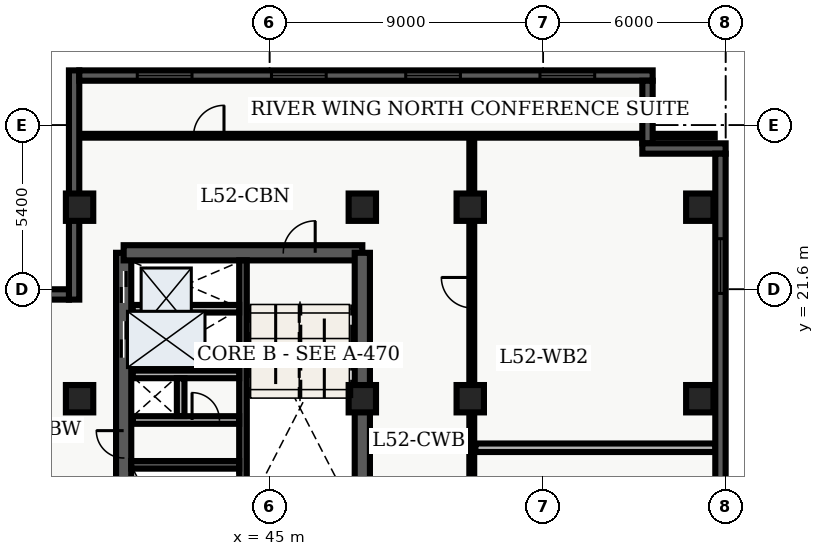
"""IFC4 building model, lengths in metres.
Left out: names, types, materials, properties, quantities, classifications, styles, units other than length and angle.
Written with IfcOpenShell. Run it as: python <this file> out.ifc"""

import sys

from ifc_helpers import new_model, entity, si_unit, converted_unit, direction, frame, origin_with_axes, origin_2d_with_axis, place, context, subcontext, project, spatial, polyline, rectangle, outline, extrude, element, fill, save


model = new_model("IFC4")
c1 = context("Model", 3, precision=1e-05, world=origin_with_axes(), true_north=direction((0.0, 1.0)))
c2 = subcontext(c1, "Body", "Model", "MODEL_VIEW")
j1 = project(units=[si_unit("LENGTHUNIT", "METRE"), converted_unit("PLANEANGLEUNIT", "DEGREE", entity("IfcPlaneAngleMeasure", 0.017), si_unit("PLANEANGLEUNIT", "RADIAN"), dimensions=[0, 0, 0, 0, 0, 0, 0])], contexts=[c1])
p1 = place(None, origin_with_axes())
s1 = spatial("IfcSite", under=j1, at=p1, CompositionType="ELEMENT")
p2 = place(p1, origin_with_axes())
s2 = spatial("IfcBuilding", under=s1, at=p2, CompositionType="ELEMENT")
p3 = place(p2, frame((0.0, 0.0, 212.1), z_axis=(0.0, 0.0, 1.0), x_axis=(1.0, 0.0, 0.0)))
s3 = spatial("IfcBuildingStorey", under=s2, at=p3, CompositionType="ELEMENT", Elevation=212.1)
p4 = place(p3, frame((40.2, 7.2, 0.0), z_axis=(0.0, 0.0, 1.0), x_axis=(0.0, 1.0, 0.0)))
e1 = element("IfcWall", 1, at=p4, inside=s3, PredefinedType="SHEAR", context=c2, shape_type="SweptSolid", body=[
    extrude(outline(polyline([(0.0, -0.25), (15.6, -0.25), (15.6, 0.25), (0.0, 0.25), (0.0, -0.25)])), origin_with_axes(), (0.0, 0.0, 1.0), 3.66),
])
p5 = place(p4, frame((14.475, 0.0, 0.0), z_axis=(0.0, 0.0, 1.0), x_axis=(1.0, 0.0, 0.0)))
e2 = element("IfcOpeningElement", 2, at=p5, cuts=e1, PredefinedType="OPENING", context=c2, shape_type="SweptSolid", body=[
    extrude(rectangle(XDim=1.05, YDim=0.52, at=origin_2d_with_axis()), origin_with_axes(), (0.0, 0.0, 1.0), 2.15),
])
p6 = place(p4, frame((12.75, 0.0, 0.0), z_axis=(0.0, 0.0, 1.0), x_axis=(1.0, 0.0, 0.0)))
e3 = element("IfcOpeningElement", 3, at=p6, cuts=e1, PredefinedType="OPENING", context=c2, shape_type="SweptSolid", body=[
    extrude(rectangle(XDim=1.2, YDim=0.52, at=origin_2d_with_axis()), origin_with_axes(), (0.0, 0.0, 1.0), 2.15),
])
p7 = place(p4, frame((9.3, 0.0, 0.0), z_axis=(0.0, 0.0, 1.0), x_axis=(1.0, 0.0, 0.0)))
e4 = element("IfcOpeningElement", 4, at=p7, cuts=e1, PredefinedType="OPENING", context=c2, shape_type="SweptSolid", body=[
    extrude(rectangle(XDim=0.9, YDim=0.52, at=origin_2d_with_axis()), origin_with_axes(), (0.0, 0.0, 1.0), 2.15),
])
p8 = place(p3, frame((40.2, 22.8, 0.0), z_axis=(0.0, 0.0, 1.0), x_axis=(1.0, 0.0, 0.0)))
e5 = element("IfcWall", 5, at=p8, inside=s3, PredefinedType="SHEAR", context=c2, shape_type="SweptSolid", body=[
    extrude(outline(polyline([(0.0, -0.25), (7.85, -0.25), (7.85, 0.25), (0.0, 0.25), (0.0, -0.25)])), origin_with_axes(), (0.0, 0.0, 1.0), 3.66),
])
p9 = place(p8, frame((5.775, 0.0, 0.0), z_axis=(0.0, 0.0, 1.0), x_axis=(1.0, 0.0, 0.0)))
e6 = element("IfcOpeningElement", 6, at=p9, cuts=e5, PredefinedType="OPENING", context=c2, shape_type="SweptSolid", body=[
    extrude(rectangle(XDim=1.05, YDim=0.52, at=origin_2d_with_axis()), origin_with_axes(), (0.0, 0.0, 1.0), 2.15),
])
p10 = place(p3, frame((48.05, 7.2, 0.0), z_axis=(0.0, 0.0, 1.0), x_axis=(0.0, 1.0, 0.0)))
e7 = element("IfcWall", 7, at=p10, inside=s3, PredefinedType="SHEAR", context=c2, shape_type="SweptSolid", body=[
    extrude(outline(polyline([(0.0, -0.25), (15.6, -0.25), (15.6, 0.25), (0.0, 0.25), (0.0, -0.25)])), origin_with_axes(), (0.0, 0.0, 1.0), 3.66),
])
p11 = place(p10, frame((5.975, 0.0, 0.0), z_axis=(0.0, 0.0, 1.0), x_axis=(1.0, 0.0, 0.0)))
e8 = element("IfcOpeningElement", 8, at=p11, cuts=e7, PredefinedType="OPENING", context=c2, shape_type="SweptSolid", body=[
    extrude(rectangle(XDim=1.05, YDim=0.52, at=origin_2d_with_axis()), origin_with_axes(), (0.0, 0.0, 1.0), 2.15),
])
p12 = place(p10, frame((2.725, 0.0, 0.0), z_axis=(0.0, 0.0, 1.0), x_axis=(1.0, 0.0, 0.0)))
e9 = element("IfcOpeningElement", 9, at=p12, cuts=e7, PredefinedType="OPENING", context=c2, shape_type="SweptSolid", body=[
    extrude(rectangle(XDim=0.95, YDim=0.52, at=origin_2d_with_axis()), origin_with_axes(), (0.0, 0.0, 1.0), 2.15),
])
p13 = place(p3, frame((44.125, 7.45, 0.0), z_axis=(0.0, 0.0, 1.0), x_axis=(0.0, 1.0, 0.0)))
e10 = element("IfcWall", 10, at=p13, inside=s3, PredefinedType="SHEAR", context=c2, shape_type="SweptSolid", body=[
    extrude(outline(polyline([(0.0, -0.125), (15.1, -0.125), (15.1, 0.125), (0.0, 0.125), (0.0, -0.125)])), origin_with_axes(), (0.0, 0.0, 1.0), 3.66),
])
p14 = place(p3, frame((40.45, 15.825, 0.0), z_axis=(0.0, 0.0, 1.0), x_axis=(1.0, 0.0, 0.0)))
e11 = element("IfcWall", 11, at=p14, inside=s3, PredefinedType="SHEAR", context=c2, shape_type="SweptSolid", body=[
    extrude(outline(polyline([(0.0, -0.125), (3.55, -0.125), (3.55, 0.125), (0.0, 0.125), (0.0, -0.125)])), origin_with_axes(), (0.0, 0.0, 1.0), 3.66),
])
p15 = place(p3, frame((40.5, 17.3, 0.0), z_axis=(0.0, 0.0, 1.0), x_axis=(1.0, 0.0, 0.0)))
e12 = element("IfcWall", 12, at=p15, inside=s3, PredefinedType="SOLIDWALL", context=c2, shape_type="SweptSolid", body=[
    extrude(outline(polyline([(0.0, -0.125), (3.5, -0.125), (3.5, 0.125), (0.0, 0.125), (0.0, -0.125)])), origin_with_axes(), (0.0, 0.0, 1.0), 2.7),
])
p16 = place(p15, frame((2.4, 0.0, 0.0), z_axis=(0.0, 0.0, 1.0), x_axis=(1.0, 0.0, 0.0)))
e13 = element("IfcOpeningElement", 13, at=p16, cuts=e12, PredefinedType="OPENING", context=c2, shape_type="SweptSolid", body=[
    extrude(rectangle(XDim=0.9, YDim=0.27, at=origin_2d_with_axis()), origin_with_axes(), (0.0, 0.0, 1.0), 2.15),
])
p17 = place(p3, frame((40.5, 18.8, 0.0), z_axis=(0.0, 0.0, 1.0), x_axis=(1.0, 0.0, 0.0)))
e14 = element("IfcWall", 14, at=p17, inside=s3, PredefinedType="SOLIDWALL", context=c2, shape_type="SweptSolid", body=[
    extrude(outline(polyline([(0.0, -0.125), (3.5, -0.125), (3.5, 0.125), (0.0, 0.125), (0.0, -0.125)])), origin_with_axes(), (0.0, 0.0, 1.0), 2.7),
])
p18 = place(p3, frame((42.075, 17.43, 0.0), z_axis=(0.0, 0.0, 1.0), x_axis=(0.0, 1.0, 0.0)))
e15 = element("IfcWall", 15, at=p18, inside=s3, PredefinedType="SOLIDWALL", context=c2, shape_type="SweptSolid", body=[
    extrude(outline(polyline([(0.0, -0.125), (1.24, -0.125), (1.24, 0.125), (0.0, 0.125), (0.0, -0.125)])), origin_with_axes(), (0.0, 0.0, 1.0), 2.7),
])
for number, where, z_axis, x_axis in (
    (16, (38.75, 18.0, 0.0), (0.0, 0.0, 1.0), (1.0, 0.0, 0.0)),
    (17, (38.75, 24.3, 0.0), (0.0, 0.0, 1.0), (1.0, 0.0, 0.0)),
    (18, (48.05, 18.0, 0.0), (0.0, 0.0, 1.0), (1.0, 0.0, 0.0)),
    (19, (48.05, 24.3, 0.0), (0.0, 0.0, 1.0), (1.0, 0.0, 0.0)),
    (20, (51.6, 18.0, 0.0), (0.0, 0.0, 1.0), (1.0, 0.0, 0.0)),
    (21, (51.6, 24.3, 0.0), (0.0, 0.0, 1.0), (1.0, 0.0, 0.0)),
    (22, (59.15, 18.0, 0.0), (0.0, 0.0, 1.0), (1.0, 0.0, 0.0)),
    (23, (59.15, 24.3, 0.0), (0.0, 0.0, 1.0), (1.0, 0.0, 0.0)),
):
    element("IfcColumn", number, at=place(p3, frame(where, z_axis=z_axis, x_axis=x_axis)), inside=s3, PredefinedType="COLUMN", context=c2, shape_type="SweptSolid", body=[
        extrude(rectangle(XDim=0.9, YDim=0.9, at=origin_2d_with_axis()), origin_with_axes(), (0.0, 0.0, 1.0), 3.9),
    ])
p19 = place(p3, frame((40.5, 20.96, 0.0), z_axis=(0.0, 0.0, 1.0), x_axis=(1.0, 0.0, 0.0)))
e24 = element("IfcWall", 24, at=p19, inside=s3, PredefinedType="SOLIDWALL", context=c2, shape_type="SweptSolid", body=[
    extrude(outline(polyline([(0.0, -0.125), (3.5, -0.125), (3.5, 0.125), (0.0, 0.125), (0.0, -0.125)])), origin_with_axes(), (0.0, 0.0, 1.0), 2.7),
])
p20 = place(p3, frame((51.65, 7.85, 0.0), z_axis=(0.0, 0.0, 1.0), x_axis=(0.0, 1.0, 0.0)))
e25 = element("IfcWall", 25, at=p20, inside=s3, PredefinedType="PARTITIONING", context=c2, shape_type="SweptSolid", body=[
    extrude(outline(polyline([(0.0, -0.08), (18.8, -0.08), (18.8, 0.08), (0.0, 0.08), (0.0, -0.08)])), origin_with_axes(), (0.0, 0.0, 1.0), 2.7),
])
p21 = place(p20, frame((4.298, 0.0, 0.0), z_axis=(0.0, 0.0, 1.0), x_axis=(1.0, 0.0, 0.0)))
e26 = element("IfcOpeningElement", 26, at=p21, cuts=e25, PredefinedType="OPENING", context=c2, shape_type="SweptSolid", body=[
    extrude(rectangle(XDim=1.0, YDim=0.18, at=origin_2d_with_axis()), origin_with_axes(), (0.0, 0.0, 1.0), 2.15),
])
p22 = place(p20, frame((13.639, 0.0, 0.0), z_axis=(0.0, 0.0, 1.0), x_axis=(1.0, 0.0, 0.0)))
e27 = element("IfcOpeningElement", 27, at=p22, cuts=e25, PredefinedType="OPENING", context=c2, shape_type="SweptSolid", body=[
    extrude(rectangle(XDim=1.0, YDim=0.18, at=origin_2d_with_axis()), origin_with_axes(), (0.0, 0.0, 1.0), 2.15),
])
p23 = place(p3, frame((38.735, 26.65, 0.0), z_axis=(0.0, 0.0, 1.0), x_axis=(1.0, 0.0, 0.0)))
e28 = element("IfcWall", 28, at=p23, inside=s3, PredefinedType="PARTITIONING", context=c2, shape_type="SweptSolid", body=[
    extrude(outline(polyline([(0.0, -0.062), (20.905, -0.062), (20.905, 0.062), (0.0, 0.062), (0.0, -0.062)])), origin_with_axes(), (0.0, 0.0, 1.0), 2.7),
])
p24 = place(p23, frame((4.265, 0.0, 0.0), z_axis=(0.0, 0.0, 1.0), x_axis=(1.0, 0.0, 0.0)))
e29 = element("IfcOpeningElement", 29, at=p24, cuts=e28, PredefinedType="OPENING", context=c2, shape_type="SweptSolid", body=[
    extrude(rectangle(XDim=1.0, YDim=0.145, at=origin_2d_with_axis()), origin_with_axes(), (0.0, 0.0, 1.0), 2.15),
])
p25 = place(p3, frame((51.77, 16.387, 0.0), z_axis=(0.0, 0.0, 1.0), x_axis=(1.0, 0.0, 0.0)))
e30 = element("IfcWall", 30, at=p25, inside=s3, PredefinedType="PARTITIONING", context=c2, shape_type="SweptSolid", body=[
    extrude(outline(polyline([(0.0, -0.14), (7.895, -0.14), (7.895, 0.14), (0.0, 0.14), (0.0, -0.14)])), origin_with_axes(), (0.0, 0.0, 1.0), 2.7),
])
p26 = place(p3, frame((38.57, 21.26, 0.0), z_axis=(0.0, 0.0, 1.0), x_axis=(0.0, 1.0, 0.0)))
e31 = element("IfcWall", 31, at=p26, inside=s3, PredefinedType="SOLIDWALL", context=c2, shape_type="SweptSolid", body=[
    extrude(outline(polyline([(0.0, -0.17), (7.54, -0.17), (7.54, 0.17), (0.0, 0.17), (0.0, -0.17)])), origin_with_axes(), (0.0, 0.0, 1.0), 3.66),
])
p27 = place(p3, frame((38.74, 28.63, 0.0), z_axis=(0.0, 0.0, 1.0), x_axis=(1.0, 0.0, 0.0)))
e32 = element("IfcWall", 32, at=p27, inside=s3, PredefinedType="SOLIDWALL", context=c2, shape_type="SweptSolid", body=[
    extrude(outline(polyline([(0.0, -0.17), (18.86, -0.17), (18.86, 0.17), (0.0, 0.17), (0.0, -0.17)])), origin_with_axes(), (0.0, 0.0, 1.0), 3.66),
])
p28 = place(p27, frame((2.808, 0.0, 0.45), z_axis=(0.0, 0.0, 1.0), x_axis=(1.0, 0.0, 0.0)))
e33 = element("IfcOpeningElement", 33, at=p28, cuts=e32, PredefinedType="OPENING", context=c2, shape_type="SweptSolid", body=[
    extrude(rectangle(XDim=1.8, YDim=0.36, at=origin_2d_with_axis()), origin_with_axes(), (0.0, 0.0, 1.0), 2.1),
])
p29 = place(p27, frame((7.222, 0.0, 0.45), z_axis=(0.0, 0.0, 1.0), x_axis=(1.0, 0.0, 0.0)))
e34 = element("IfcOpeningElement", 34, at=p29, cuts=e32, PredefinedType="OPENING", context=c2, shape_type="SweptSolid", body=[
    extrude(rectangle(XDim=1.8, YDim=0.36, at=origin_2d_with_axis()), origin_with_axes(), (0.0, 0.0, 1.0), 2.1),
])
p30 = place(p27, frame((11.637, 0.0, 0.45), z_axis=(0.0, 0.0, 1.0), x_axis=(1.0, 0.0, 0.0)))
e35 = element("IfcOpeningElement", 35, at=p30, cuts=e32, PredefinedType="OPENING", context=c2, shape_type="SweptSolid", body=[
    extrude(rectangle(XDim=1.8, YDim=0.36, at=origin_2d_with_axis()), origin_with_axes(), (0.0, 0.0, 1.0), 2.1),
])
p31 = place(p27, frame((16.053, 0.0, 0.45), z_axis=(0.0, 0.0, 1.0), x_axis=(1.0, 0.0, 0.0)))
e36 = element("IfcOpeningElement", 36, at=p31, cuts=e32, PredefinedType="OPENING", context=c2, shape_type="SweptSolid", body=[
    extrude(rectangle(XDim=1.8, YDim=0.36, at=origin_2d_with_axis()), origin_with_axes(), (0.0, 0.0, 1.0), 2.1),
])
p32 = place(p3, frame((57.43, 28.46, 0.0), z_axis=(0.0, 0.0, 1.0), x_axis=(0.0, -1.0, 0.0)))
e37 = element("IfcWall", 37, at=p32, inside=s3, PredefinedType="SOLIDWALL", context=c2, shape_type="SweptSolid", body=[
    extrude(outline(polyline([(0.0, -0.17), (2.06, -0.17), (2.06, 0.17), (0.0, 0.17), (0.0, -0.17)])), origin_with_axes(), (0.0, 0.0, 1.0), 3.66),
])
p33 = place(p3, frame((57.26, 26.23, 0.0), z_axis=(0.0, 0.0, 1.0), x_axis=(1.0, 0.0, 0.0)))
e38 = element("IfcWall", 38, at=p33, inside=s3, PredefinedType="SOLIDWALL", context=c2, shape_type="SweptSolid", body=[
    extrude(outline(polyline([(0.0, -0.17), (2.74, -0.17), (2.74, 0.17), (0.0, 0.17), (0.0, -0.17)])), origin_with_axes(), (0.0, 0.0, 1.0), 3.66),
])
p34 = place(p3, frame((59.83, 26.06, 0.0), z_axis=(0.0, 0.0, 1.0), x_axis=(0.0, -1.0, 0.0)))
e39 = element("IfcWall", 39, at=p34, inside=s3, PredefinedType="SOLIDWALL", context=c2, shape_type="SweptSolid", body=[
    extrude(outline(polyline([(0.0, -0.17), (23.66, -0.17), (23.66, 0.17), (0.0, 0.17), (0.0, -0.17)])), origin_with_axes(), (0.0, 0.0, 1.0), 3.66),
])
p35 = place(p34, frame((3.696, 0.0, 0.45), z_axis=(0.0, 0.0, 1.0), x_axis=(1.0, 0.0, 0.0)))
e40 = element("IfcOpeningElement", 40, at=p35, cuts=e39, PredefinedType="OPENING", context=c2, shape_type="SweptSolid", body=[
    extrude(rectangle(XDim=1.8, YDim=0.36, at=origin_2d_with_axis()), origin_with_axes(), (0.0, 0.0, 1.0), 2.1),
])
p36 = place(p34, frame((11.83, 0.0, 0.45), z_axis=(0.0, 0.0, 1.0), x_axis=(1.0, 0.0, 0.0)))
e41 = element("IfcOpeningElement", 41, at=p36, cuts=e39, PredefinedType="OPENING", context=c2, shape_type="SweptSolid", body=[
    extrude(rectangle(XDim=1.8, YDim=0.36, at=origin_2d_with_axis()), origin_with_axes(), (0.0, 0.0, 1.0), 2.1),
])
p37 = place(p34, frame((20.364, 0.0, 0.45), z_axis=(0.0, 0.0, 1.0), x_axis=(1.0, 0.0, 0.0)))
e42 = element("IfcOpeningElement", 42, at=p37, cuts=e39, PredefinedType="OPENING", context=c2, shape_type="SweptSolid", body=[
    extrude(rectangle(XDim=1.8, YDim=0.36, at=origin_2d_with_axis()), origin_with_axes(), (0.0, 0.0, 1.0), 2.1),
])
p38 = place(p3, frame((31.185, 21.43, 0.0), z_axis=(0.0, 0.0, 1.0), x_axis=(1.0, 0.0, 0.0)))
e43 = element("IfcWall", 43, at=p38, inside=s3, PredefinedType="SOLIDWALL", context=c2, shape_type="SweptSolid", body=[
    extrude(outline(polyline([(0.0, -0.17), (7.215, -0.17), (7.215, 0.17), (0.0, 0.17), (0.0, -0.17)])), origin_with_axes(), (0.0, 0.0, 1.0), 3.66),
])
p39 = place(p38, frame((3.608, 0.0, 0.45), z_axis=(0.0, 0.0, 1.0), x_axis=(1.0, 0.0, 0.0)))
e44 = element("IfcOpeningElement", 44, at=p39, cuts=e43, PredefinedType="OPENING", context=c2, shape_type="SweptSolid", body=[
    extrude(rectangle(XDim=1.8, YDim=0.36, at=origin_2d_with_axis()), origin_with_axes(), (0.0, 0.0, 1.0), 2.1),
])
p40 = place(p4, frame((14.475, 0.0, 0.0), z_axis=(0.0, 0.0, 1.0), x_axis=(1.0, 0.0, 0.0)))
e45 = element("IfcDoor", 45, at=p40, inside=s3, OperationType="SLIDING_TO_RIGHT", PredefinedType="DOOR", context=c2, shape_type="SweptSolid", body=[
    extrude(rectangle(XDim=1.05, YDim=0.09, at=origin_2d_with_axis()), origin_with_axes(), (0.0, 0.0, 1.0), 2.15),
])
fill(e2, e45)
p41 = place(p4, frame((12.75, 0.0, 0.0), z_axis=(0.0, 0.0, 1.0), x_axis=(1.0, 0.0, 0.0)))
e46 = element("IfcDoor", 46, at=p41, inside=s3, OperationType="DOUBLE_DOOR_SLIDING", PredefinedType="DOOR", context=c2, shape_type="SweptSolid", body=[
    extrude(rectangle(XDim=1.2, YDim=0.09, at=origin_2d_with_axis()), origin_with_axes(), (0.0, 0.0, 1.0), 2.15),
])
fill(e3, e46)
p42 = place(p4, frame((9.3, 0.0, 0.0), z_axis=(0.0, 0.0, 1.0), x_axis=(1.0, 0.0, 0.0)))
e47 = element("IfcDoor", 47, at=p42, inside=s3, OperationType="SINGLE_SWING_RIGHT", PredefinedType="DOOR", context=c2, shape_type="SweptSolid", body=[
    extrude(rectangle(XDim=0.9, YDim=0.09, at=origin_2d_with_axis()), origin_with_axes(), (0.0, 0.0, 1.0), 2.15),
])
fill(e4, e47)
p43 = place(p15, frame((2.4, 0.0, 0.0), z_axis=(0.0, 0.0, 1.0), x_axis=(1.0, 0.0, 0.0)))
e48 = element("IfcDoor", 48, at=p43, inside=s3, OperationType="SINGLE_SWING_LEFT", PredefinedType="DOOR", context=c2, shape_type="SweptSolid", body=[
    extrude(rectangle(XDim=0.9, YDim=0.09, at=origin_2d_with_axis()), origin_with_axes(), (0.0, 0.0, 1.0), 2.15),
])
fill(e13, e48)
p44 = place(p8, frame((5.775, 0.0, 0.0), z_axis=(0.0, 0.0, 1.0), x_axis=(1.0, 0.0, 0.0)))
e49 = element("IfcDoor", 49, at=p44, inside=s3, OperationType="SINGLE_SWING_RIGHT", PredefinedType="DOOR", context=c2, shape_type="SweptSolid", body=[
    extrude(rectangle(XDim=1.05, YDim=0.09, at=origin_2d_with_axis()), origin_with_axes(), (0.0, 0.0, 1.0), 2.15),
])
fill(e6, e49)
p45 = place(p23, frame((4.265, 0.0, 0.0), z_axis=(0.0, 0.0, 1.0), x_axis=(1.0, 0.0, 0.0)))
e50 = element("IfcDoor", 50, at=p45, inside=s3, OperationType="SINGLE_SWING_RIGHT", PredefinedType="DOOR", context=c2, shape_type="SweptSolid", body=[
    extrude(rectangle(XDim=1.0, YDim=0.075, at=origin_2d_with_axis()), origin_with_axes(), (0.0, 0.0, 1.0), 2.15),
])
fill(e29, e50)
p46 = place(p20, frame((13.639, 0.0, 0.0), z_axis=(0.0, 0.0, 1.0), x_axis=(1.0, 0.0, 0.0)))
e51 = element("IfcDoor", 51, at=p46, inside=s3, OperationType="SINGLE_SWING_RIGHT", PredefinedType="DOOR", context=c2, shape_type="SweptSolid", body=[
    extrude(rectangle(XDim=1.0, YDim=0.09, at=origin_2d_with_axis()), origin_with_axes(), (0.0, 0.0, 1.0), 2.15),
])
fill(e27, e51)
p47 = place(p27, frame((2.808, 0.0, 0.45), z_axis=(0.0, 0.0, 1.0), x_axis=(1.0, 0.0, 0.0)))
e52 = element("IfcWindow", 52, at=p47, inside=s3, PredefinedType="WINDOW", context=c2, shape_type="SweptSolid", body=[
    extrude(rectangle(XDim=1.8, YDim=0.09, at=origin_2d_with_axis()), origin_with_axes(), (0.0, 0.0, 1.0), 2.1),
])
fill(e33, e52)
p48 = place(p27, frame((7.222, 0.0, 0.45), z_axis=(0.0, 0.0, 1.0), x_axis=(1.0, 0.0, 0.0)))
e53 = element("IfcWindow", 53, at=p48, inside=s3, PredefinedType="WINDOW", context=c2, shape_type="SweptSolid", body=[
    extrude(rectangle(XDim=1.8, YDim=0.09, at=origin_2d_with_axis()), origin_with_axes(), (0.0, 0.0, 1.0), 2.1),
])
fill(e34, e53)
p49 = place(p27, frame((11.637, 0.0, 0.45), z_axis=(0.0, 0.0, 1.0), x_axis=(1.0, 0.0, 0.0)))
e54 = element("IfcWindow", 54, at=p49, inside=s3, PredefinedType="WINDOW", context=c2, shape_type="SweptSolid", body=[
    extrude(rectangle(XDim=1.8, YDim=0.09, at=origin_2d_with_axis()), origin_with_axes(), (0.0, 0.0, 1.0), 2.1),
])
fill(e35, e54)
p50 = place(p27, frame((16.053, 0.0, 0.45), z_axis=(0.0, 0.0, 1.0), x_axis=(1.0, 0.0, 0.0)))
e55 = element("IfcWindow", 55, at=p50, inside=s3, PredefinedType="WINDOW", context=c2, shape_type="SweptSolid", body=[
    extrude(rectangle(XDim=1.8, YDim=0.09, at=origin_2d_with_axis()), origin_with_axes(), (0.0, 0.0, 1.0), 2.1),
])
fill(e36, e55)
p51 = place(p34, frame((3.696, 0.0, 0.45), z_axis=(0.0, 0.0, 1.0), x_axis=(1.0, 0.0, 0.0)))
e56 = element("IfcWindow", 56, at=p51, inside=s3, PredefinedType="WINDOW", context=c2, shape_type="SweptSolid", body=[
    extrude(rectangle(XDim=1.8, YDim=0.09, at=origin_2d_with_axis()), origin_with_axes(), (0.0, 0.0, 1.0), 2.1),
])
fill(e40, e56)
save(model, sys.argv[1])
